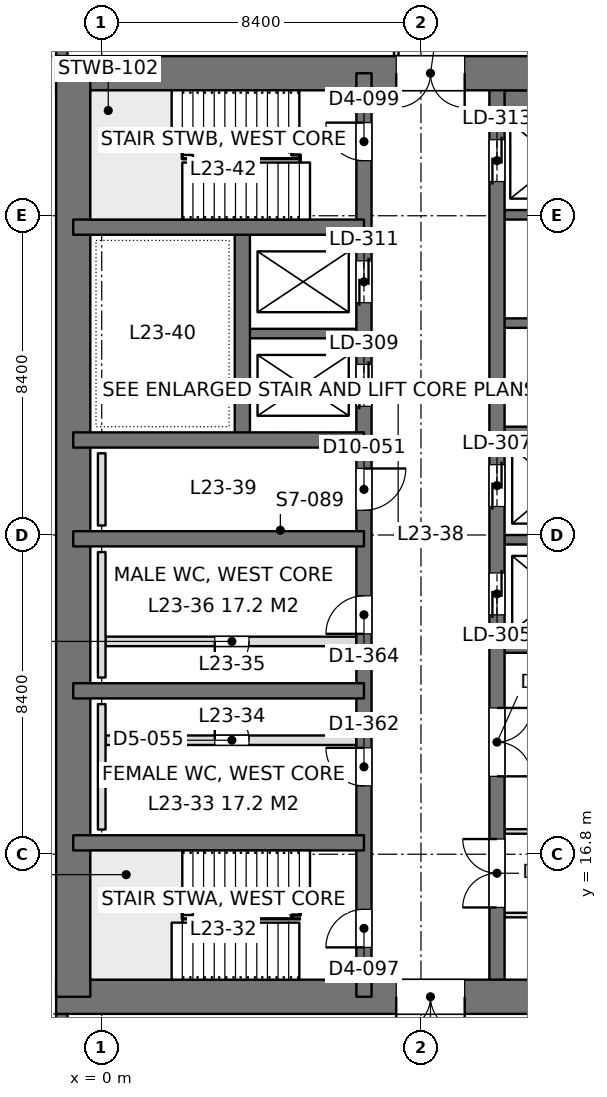
"""IFC4 building model, lengths in metres.
Left out: names, types, materials, properties, quantities, classifications, styles, units other than length and angle.
Written with IfcOpenShell. Run it as: python <this file> out.ifc"""

import sys

from ifc_helpers import new_model, si_unit, direction, frame, frame_2d, origin, place, context, subcontext, project, spatial, rectangle, extrude, element, fill, save


model = new_model("IFC4")
c1 = context("Model", 3, precision=1e-05, world=origin(), true_north=direction((0.0, 1.0)))
c2 = subcontext(c1, "Body", "Model", "MODEL_VIEW")
j1 = project(units=[si_unit("LENGTHUNIT", "METRE"), si_unit("PLANEANGLEUNIT", "RADIAN")], contexts=[c1])
p1 = place(None, origin())
s1 = spatial("IfcSite", under=j1, at=p1, CompositionType="ELEMENT")
p2 = place(p1, origin())
s2 = spatial("IfcBuilding", under=s1, at=p2, CompositionType="ELEMENT")
p3 = place(p2, frame((0.0, 0.0, 105.0)))
s3 = spatial("IfcBuildingStorey", under=s2, at=p3, CompositionType="ELEMENT", Elevation=105.0)
p4 = place(p3, frame((-1.2, 13.05, 0.0), z_axis=(0.0, 0.0, 1.0), x_axis=(1.0, 0.0, 0.0)))
e1 = element("IfcWall", 1, at=p4, inside=s3, PredefinedType="SHEAR", context=c2, shape_type="SweptSolid", body=[
    extrude(rectangle(XDim=18.0, YDim=0.9, at=frame_2d((9.0, 0.0))), origin(), (0.0, 0.0, 1.0), 4.2),
])
p5 = place(p4, frame((8.95, 0.0, 0.0)))
e2 = element("IfcOpeningElement", 2, at=p5, cuts=e1, PredefinedType="OPENING", context=c2, shape_type="SweptSolid", body=[
    extrude(rectangle(XDim=1.8, YDim=2.4, at=frame_2d((0.9, 1.2))), frame((0.0, 0.46, 0.0), z_axis=(0.0, -1.0, 0.0), x_axis=(1.0, 0.0, 0.0)), (0.0, 0.0, 1.0), 0.92),
])
p6 = place(p3, frame((-1.2, 37.35, 0.0), z_axis=(0.0, 0.0, 1.0), x_axis=(1.0, 0.0, 0.0)))
e3 = element("IfcWall", 3, at=p6, inside=s3, PredefinedType="SHEAR", context=c2, shape_type="SweptSolid", body=[
    extrude(rectangle(XDim=18.0, YDim=0.9, at=frame_2d((9.0, 0.0))), origin(), (0.0, 0.0, 1.0), 4.2),
])
p7 = place(p6, frame((8.95, 0.0, 0.0)))
e4 = element("IfcOpeningElement", 4, at=p7, cuts=e3, PredefinedType="OPENING", context=c2, shape_type="SweptSolid", body=[
    extrude(rectangle(XDim=1.8, YDim=2.4, at=frame_2d((0.9, 1.2))), frame((0.0, 0.46, 0.0), z_axis=(0.0, -1.0, 0.0), x_axis=(1.0, 0.0, 0.0)), (0.0, 0.0, 1.0), 0.92),
])
p8 = place(p3, frame((-0.75, 13.05, 0.0), z_axis=(0.0, 0.0, 1.0), x_axis=(0.0, 1.0, 0.0)))
e5 = element("IfcWall", 5, at=p8, inside=s3, PredefinedType="SHEAR", context=c2, shape_type="SweptSolid", body=[
    extrude(rectangle(XDim=24.3, YDim=0.9, at=frame_2d((12.15, 0.0))), origin(), (0.0, 0.0, 1.0), 4.2),
])
p9 = place(p3, frame((6.9, 13.05, 0.0), z_axis=(0.0, 0.0, 1.0), x_axis=(0.0, 1.0, 0.0)))
e6 = element("IfcWall", 6, at=p9, inside=s3, PredefinedType="SHEAR", context=c2, shape_type="SweptSolid", body=[
    extrude(rectangle(XDim=24.3, YDim=0.4, at=frame_2d((12.15, 0.0))), origin(), (0.0, 0.0, 1.0), 4.2),
])
p10 = place(p9, frame((1.3, 0.0, 0.0)))
e7 = element("IfcOpeningElement", 7, at=p10, cuts=e6, PredefinedType="OPENING", context=c2, shape_type="SweptSolid", body=[
    extrude(rectangle(XDim=1.0, YDim=2.2, at=frame_2d((0.5, 1.1))), frame((0.0, 0.21, 0.0), z_axis=(0.0, -1.0, 0.0), x_axis=(1.0, 0.0, 0.0)), (0.0, 0.0, 1.0), 0.42),
])
p11 = place(p9, frame((22.0, 0.0, 0.0)))
e8 = element("IfcOpeningElement", 8, at=p11, cuts=e6, PredefinedType="OPENING", context=c2, shape_type="SweptSolid", body=[
    extrude(rectangle(XDim=1.0, YDim=2.2, at=frame_2d((0.5, 1.1))), frame((0.0, 0.21, 0.0), z_axis=(0.0, -1.0, 0.0), x_axis=(1.0, 0.0, 0.0)), (0.0, 0.0, 1.0), 0.42),
])
p12 = place(p9, frame((5.55, 0.0, 0.0)))
e9 = element("IfcOpeningElement", 9, at=p12, cuts=e6, PredefinedType="OPENING", context=c2, shape_type="SweptSolid", body=[
    extrude(rectangle(XDim=1.0, YDim=2.2, at=frame_2d((0.5, 1.1))), frame((0.0, 0.21, 0.0), z_axis=(0.0, -1.0, 0.0), x_axis=(1.0, 0.0, 0.0)), (0.0, 0.0, 1.0), 0.42),
])
p13 = place(p9, frame((9.55, 0.0, 0.0)))
e10 = element("IfcOpeningElement", 10, at=p13, cuts=e6, PredefinedType="OPENING", context=c2, shape_type="SweptSolid", body=[
    extrude(rectangle(XDim=1.0, YDim=2.2, at=frame_2d((0.5, 1.1))), frame((0.0, 0.21, 0.0), z_axis=(0.0, -1.0, 0.0), x_axis=(1.0, 0.0, 0.0)), (0.0, 0.0, 1.0), 0.42),
])
p14 = place(p9, frame((12.8, 0.0, 0.0)))
e11 = element("IfcOpeningElement", 11, at=p14, cuts=e6, PredefinedType="OPENING", context=c2, shape_type="SweptSolid", body=[
    extrude(rectangle(XDim=1.1, YDim=2.2, at=frame_2d((0.55, 1.1))), frame((0.0, 0.21, 0.0), z_axis=(0.0, -1.0, 0.0), x_axis=(1.0, 0.0, 0.0)), (0.0, 0.0, 1.0), 0.42),
])
p15 = place(p9, frame((15.538, 0.0, 0.0)))
e12 = element("IfcOpeningElement", 12, at=p15, cuts=e6, PredefinedType="OPENING", context=c2, shape_type="SweptSolid", body=[
    extrude(rectangle(XDim=1.1, YDim=2.2, at=frame_2d((0.55, 1.1))), frame((0.0, 0.21, 0.0), z_axis=(0.0, -1.0, 0.0), x_axis=(1.0, 0.0, 0.0)), (0.0, 0.0, 1.0), 0.42),
])
p16 = place(p9, frame((18.262, 0.0, 0.0)))
e13 = element("IfcOpeningElement", 13, at=p16, cuts=e6, PredefinedType="OPENING", context=c2, shape_type="SweptSolid", body=[
    extrude(rectangle(XDim=1.1, YDim=2.2, at=frame_2d((0.55, 1.1))), frame((0.0, 0.21, 0.0), z_axis=(0.0, -1.0, 0.0), x_axis=(1.0, 0.0, 0.0)), (0.0, 0.0, 1.0), 0.42),
])
p17 = place(p3, frame((10.4, 13.05, 0.0), z_axis=(0.0, 0.0, 1.0), x_axis=(0.0, 1.0, 0.0)))
e14 = element("IfcWall", 14, at=p17, inside=s3, PredefinedType="SHEAR", context=c2, shape_type="SweptSolid", body=[
    extrude(rectangle(XDim=24.3, YDim=0.4, at=frame_2d((12.15, 0.0))), origin(), (0.0, 0.0, 1.0), 4.2),
])
p18 = place(p17, frame((10.05, 0.0, 0.0)))
e15 = element("IfcOpeningElement", 15, at=p18, cuts=e14, PredefinedType="OPENING", context=c2, shape_type="SweptSolid", body=[
    extrude(rectangle(XDim=1.1, YDim=2.2, at=frame_2d((0.55, 1.1))), frame((0.0, 0.21, 0.0), z_axis=(0.0, -1.0, 0.0), x_axis=(1.0, 0.0, 0.0)), (0.0, 0.0, 1.0), 0.42),
])
p19 = place(p17, frame((12.9, 0.0, 0.0)))
e16 = element("IfcOpeningElement", 16, at=p19, cuts=e14, PredefinedType="OPENING", context=c2, shape_type="SweptSolid", body=[
    extrude(rectangle(XDim=1.1, YDim=2.2, at=frame_2d((0.55, 1.1))), frame((0.0, 0.21, 0.0), z_axis=(0.0, -1.0, 0.0), x_axis=(1.0, 0.0, 0.0)), (0.0, 0.0, 1.0), 0.42),
])
p20 = place(p17, frame((21.45, 0.0, 0.0)))
e17 = element("IfcOpeningElement", 17, at=p20, cuts=e14, PredefinedType="OPENING", context=c2, shape_type="SweptSolid", body=[
    extrude(rectangle(XDim=1.1, YDim=2.2, at=frame_2d((0.55, 1.1))), frame((0.0, 0.21, 0.0), z_axis=(0.0, -1.0, 0.0), x_axis=(1.0, 0.0, 0.0)), (0.0, 0.0, 1.0), 0.42),
])
p21 = place(p17, frame((2.35, 0.0, 0.0)))
e18 = element("IfcOpeningElement", 18, at=p21, cuts=e14, PredefinedType="OPENING", context=c2, shape_type="SweptSolid", body=[
    extrude(rectangle(XDim=1.8, YDim=2.4, at=frame_2d((0.9, 1.2))), frame((0.0, 0.21, 0.0), z_axis=(0.0, -1.0, 0.0), x_axis=(1.0, 0.0, 0.0)), (0.0, 0.0, 1.0), 0.42),
])
p22 = place(p17, frame((5.8, 0.0, 0.0)))
e19 = element("IfcOpeningElement", 19, at=p22, cuts=e14, PredefinedType="OPENING", context=c2, shape_type="SweptSolid", body=[
    extrude(rectangle(XDim=1.8, YDim=2.4, at=frame_2d((0.9, 1.2))), frame((0.0, 0.21, 0.0), z_axis=(0.0, -1.0, 0.0), x_axis=(1.0, 0.0, 0.0)), (0.0, 0.0, 1.0), 0.42),
])
for number, where, z_axis, x_axis in (
    (20, (-0.75, 17.1, 0.0), (0.0, 0.0, 1.0), (1.0, 0.0, 0.0)),
    (21, (-0.75, 21.1, 0.0), (0.0, 0.0, 1.0), (1.0, 0.0, 0.0)),
    (22, (-0.75, 25.1, 0.0), (0.0, 0.0, 1.0), (1.0, 0.0, 0.0)),
    (23, (-0.75, 27.7, 0.0), (0.0, 0.0, 1.0), (1.0, 0.0, 0.0)),
    (24, (-0.75, 33.3, 0.0), (0.0, 0.0, 1.0), (1.0, 0.0, 0.0)),
):
    element("IfcWall", number, at=place(p3, frame(where, z_axis=z_axis, x_axis=x_axis)), inside=s3, PredefinedType="SHEAR", context=c2, shape_type="SweptSolid", body=[
        extrude(rectangle(XDim=7.65, YDim=0.4, at=frame_2d((3.825, 0.0))), origin(), (0.0, 0.0, 1.0), 4.2),
    ])
p23 = place(p3, frame((3.7, 27.7, 0.0), z_axis=(0.0, 0.0, 1.0), x_axis=(0.0, 1.0, 0.0)))
e25 = element("IfcWall", 25, at=p23, inside=s3, PredefinedType="SHEAR", context=c2, shape_type="SweptSolid", body=[
    extrude(rectangle(XDim=5.6, YDim=0.4, at=frame_2d((2.8, 0.0))), origin(), (0.0, 0.0, 1.0), 4.2),
])
p24 = place(p3, frame((3.7, 30.5, 0.0), z_axis=(0.0, 0.0, 1.0), x_axis=(1.0, 0.0, 0.0)))
e26 = element("IfcWall", 26, at=p24, inside=s3, PredefinedType="SHEAR", context=c2, shape_type="SweptSolid", body=[
    extrude(rectangle(XDim=3.2, YDim=0.25, at=frame_2d((1.6, 0.0))), origin(), (0.0, 0.0, 1.0), 4.2),
])
p25 = place(p3, frame((10.4, 22.225, 0.0), z_axis=(0.0, 0.0, 1.0), x_axis=(1.0, 0.0, 0.0)))
e27 = element("IfcWall", 27, at=p25, inside=s3, PredefinedType="SHEAR", context=c2, shape_type="SweptSolid", body=[
    extrude(rectangle(XDim=5.95, YDim=0.25, at=frame_2d((2.975, 0.0))), origin(), (0.0, 0.0, 1.0), 4.2),
])
for number, where, z_axis, x_axis in (
    (28, (10.4, 25.075, 0.0), (0.0, 0.0, 1.0), (1.0, 0.0, 0.0)),
    (29, (10.4, 27.925, 0.0), (0.0, 0.0, 1.0), (1.0, 0.0, 0.0)),
    (30, (10.4, 30.775, 0.0), (0.0, 0.0, 1.0), (1.0, 0.0, 0.0)),
    (31, (10.4, 33.625, 0.0), (0.0, 0.0, 1.0), (1.0, 0.0, 0.0)),
):
    element("IfcWall", number, at=place(p3, frame(where, z_axis=z_axis, x_axis=x_axis)), inside=s3, PredefinedType="SHEAR", context=c2, shape_type="SweptSolid", body=[
        extrude(rectangle(XDim=3.2, YDim=0.25, at=frame_2d((1.6, 0.0))), origin(), (0.0, 0.0, 1.0), 4.2),
    ])
p26 = place(p3, frame((10.4, 36.625, 0.0), z_axis=(0.0, 0.0, 1.0), x_axis=(1.0, 0.0, 0.0)))
e32 = element("IfcWall", 32, at=p26, inside=s3, PredefinedType="SHEAR", context=c2, shape_type="SweptSolid", body=[
    extrude(rectangle(XDim=3.2, YDim=0.55, at=frame_2d((1.6, 0.0))), origin(), (0.0, 0.0, 1.0), 4.2),
])
p27 = place(p3, frame((-1.05, 8.4, 0.0), z_axis=(0.0, 0.0, 1.0), x_axis=(0.0, 1.0, 0.0)))
e33 = element("IfcWall", 33, at=p27, inside=s3, PredefinedType="SOLIDWALL", context=c2, shape_type="SweptSolid", body=[
    extrude(rectangle(XDim=4.2, YDim=0.3, at=frame_2d((2.1, 0.0))), origin(), (0.0, 0.0, 1.0), 4.05),
])
p28 = place(p27, frame((0.9, 0.0, 0.9)))
e34 = element("IfcOpeningElement", 34, at=p28, cuts=e33, PredefinedType="OPENING", context=c2, shape_type="SweptSolid", body=[
    extrude(rectangle(XDim=2.4, YDim=1.9, at=frame_2d((1.2, 0.95))), frame((0.0, 0.16, 0.0), z_axis=(0.0, -1.0, 0.0), x_axis=(1.0, 0.0, 0.0)), (0.0, 0.0, 1.0), 0.32),
])
p29 = place(p3, frame((-1.05, 37.8, 0.0), z_axis=(0.0, 0.0, 1.0), x_axis=(0.0, 1.0, 0.0)))
e35 = element("IfcWall", 35, at=p29, inside=s3, PredefinedType="SOLIDWALL", context=c2, shape_type="SweptSolid", body=[
    extrude(rectangle(XDim=4.2, YDim=0.3, at=frame_2d((2.1, 0.0))), origin(), (0.0, 0.0, 1.0), 4.05),
])
p30 = place(p29, frame((0.9, 0.0, 0.9)))
e36 = element("IfcOpeningElement", 36, at=p30, cuts=e35, PredefinedType="OPENING", context=c2, shape_type="SweptSolid", body=[
    extrude(rectangle(XDim=2.4, YDim=1.9, at=frame_2d((1.2, 0.95))), frame((0.0, 0.16, 0.0), z_axis=(0.0, -1.0, 0.0), x_axis=(1.0, 0.0, 0.0)), (0.0, 0.0, 1.0), 0.32),
])
p31 = place(p3, frame((10.598, 17.4, 0.0), z_axis=(0.0, 0.0, 1.0), x_axis=(1.0, 0.0, 0.0)))
e37 = element("IfcWall", 37, at=p31, inside=s3, PredefinedType="PARTITIONING", context=c2, shape_type="SweptSolid", body=[
    extrude(rectangle(XDim=5.904, YDim=0.12, at=frame_2d((2.952, 0.0))), origin(), (0.0, 0.0, 1.0), 3.55),
])
p32 = place(p31, frame((4.152, 0.0, 0.0)))
e38 = element("IfcOpeningElement", 38, at=p32, cuts=e37, PredefinedType="OPENING", context=c2, shape_type="SweptSolid", body=[
    extrude(rectangle(XDim=1.0, YDim=2.4, at=frame_2d((0.5, 1.2))), frame((0.0, 0.07, 0.0), z_axis=(0.0, -1.0, 0.0), x_axis=(1.0, 0.0, 0.0)), (0.0, 0.0, 1.0), 0.14),
])
p33 = place(p3, frame((10.598, 15.2, 0.0), z_axis=(0.0, 0.0, 1.0), x_axis=(1.0, 0.0, 0.0)))
e39 = element("IfcWall", 39, at=p33, inside=s3, PredefinedType="PARTITIONING", context=c2, shape_type="SweptSolid", body=[
    extrude(rectangle(XDim=6.204, YDim=0.12, at=frame_2d((3.102, 0.0))), origin(), (0.0, 0.0, 1.0), 3.55),
])
p34 = place(p3, frame((7.75, 37.8, 0.0), z_axis=(0.0, 0.0, 1.0), x_axis=(0.0, 1.0, 0.0)))
e40 = element("IfcWall", 40, at=p34, inside=s3, PredefinedType="PARTITIONING", context=c2, shape_type="SweptSolid", body=[
    extrude(rectangle(XDim=2.0, YDim=0.12, at=frame_2d((1.0, 0.0))), origin(), (0.0, 0.0, 1.0), 4.05),
])
p35 = place(p3, frame((0.1, 22.4, 0.0), z_axis=(0.0, 0.0, 1.0), x_axis=(1.0, 0.0, 0.0)))
e41 = element("IfcWall", 41, at=p35, inside=s3, PredefinedType="PARTITIONING", context=c2, shape_type="SweptSolid", body=[
    extrude(rectangle(XDim=6.6, YDim=0.25, at=frame_2d((3.3, 0.0))), origin(), (0.0, 0.0, 1.0), 4.0),
])
p36 = place(p35, frame((2.875, 0.0, 0.0)))
e42 = element("IfcOpeningElement", 42, at=p36, cuts=e41, PredefinedType="OPENING", context=c2, shape_type="SweptSolid", body=[
    extrude(rectangle(XDim=0.9, YDim=2.2, at=frame_2d((0.45, 1.1))), frame((0.0, 0.135, 0.0), z_axis=(0.0, -1.0, 0.0), x_axis=(1.0, 0.0, 0.0)), (0.0, 0.0, 1.0), 0.27),
])
p37 = place(p3, frame((0.1, 19.8, 0.0), z_axis=(0.0, 0.0, 1.0), x_axis=(1.0, 0.0, 0.0)))
e43 = element("IfcWall", 43, at=p37, inside=s3, PredefinedType="PARTITIONING", context=c2, shape_type="SweptSolid", body=[
    extrude(rectangle(XDim=6.6, YDim=0.25, at=frame_2d((3.3, 0.0))), origin(), (0.0, 0.0, 1.0), 4.0),
])
p38 = place(p37, frame((2.875, 0.0, 0.0)))
e44 = element("IfcOpeningElement", 44, at=p38, cuts=e43, PredefinedType="OPENING", context=c2, shape_type="SweptSolid", body=[
    extrude(rectangle(XDim=0.9, YDim=2.2, at=frame_2d((0.45, 1.1))), frame((0.0, 0.135, 0.0), z_axis=(0.0, -1.0, 0.0), x_axis=(1.0, 0.0, 0.0)), (0.0, 0.0, 1.0), 0.27),
])
for number, where, z_axis, x_axis in (
    (45, (0.0, 17.45, 0.0), (0.0, 0.0, 1.0), (0.0, 1.0, 0.0)),
    (46, (0.0, 21.45, 0.0), (0.0, 0.0, 1.0), (0.0, 1.0, 0.0)),
):
    element("IfcWall", number, at=place(p3, frame(where, z_axis=z_axis, x_axis=x_axis)), inside=s3, PredefinedType="PLUMBINGWALL", context=c2, shape_type="SweptSolid", body=[
        extrude(rectangle(XDim=3.3, YDim=0.2, at=frame_2d((1.65, 0.0))), origin(), (0.0, 0.0, 1.0), 1.2),
    ])
p39 = place(p3, frame((0.0, 25.45, 0.0), z_axis=(0.0, 0.0, 1.0), x_axis=(0.0, 1.0, 0.0)))
e47 = element("IfcWall", 47, at=p39, inside=s3, PredefinedType="PLUMBINGWALL", context=c2, shape_type="SweptSolid", body=[
    extrude(rectangle(XDim=1.9, YDim=0.2, at=frame_2d((0.95, 0.0))), origin(), (0.0, 0.0, 1.0), 1.2),
])
p40 = place(p5, frame((1.8, 0.0, 0.0), z_axis=(0.0, 0.0, 1.0), x_axis=(-1.0, 0.0, 0.0)))
e48 = element("IfcDoor", 48, at=p40, inside=s3, OperationType="DOUBLE_DOOR_SINGLE_SWING", PredefinedType="DOOR", context=c2, shape_type="SweptSolid", body=[
    extrude(rectangle(XDim=1.8, YDim=2.4, at=frame_2d((0.9, 1.2))), frame((0.0, 0.025, 0.0), z_axis=(0.0, -1.0, 0.0), x_axis=(1.0, 0.0, 0.0)), (0.0, 0.0, 1.0), 0.05),
])
fill(e2, e48)
p41 = place(p7, frame((1.8, 0.0, 0.0), z_axis=(0.0, 0.0, 1.0), x_axis=(-1.0, 0.0, 0.0)))
e49 = element("IfcDoor", 49, at=p41, inside=s3, OperationType="DOUBLE_DOOR_SINGLE_SWING", PredefinedType="DOOR", context=c2, shape_type="SweptSolid", body=[
    extrude(rectangle(XDim=1.8, YDim=2.4, at=frame_2d((0.9, 1.2))), frame((0.0, 0.025, 0.0), z_axis=(0.0, -1.0, 0.0), x_axis=(1.0, 0.0, 0.0)), (0.0, 0.0, 1.0), 0.05),
])
fill(e4, e49)
p42 = place(p10, origin())
e50 = element("IfcDoor", 50, at=p42, inside=s3, OperationType="SINGLE_SWING_LEFT", PredefinedType="DOOR", context=c2, shape_type="SweptSolid", body=[
    extrude(rectangle(XDim=1.0, YDim=2.2, at=frame_2d((0.5, 1.1))), frame((0.0, 0.025, 0.0), z_axis=(0.0, -1.0, 0.0), x_axis=(1.0, 0.0, 0.0)), (0.0, 0.0, 1.0), 0.05),
])
fill(e7, e50)
p43 = place(p11, origin())
e51 = element("IfcDoor", 51, at=p43, inside=s3, OperationType="SINGLE_SWING_RIGHT", PredefinedType="DOOR", context=c2, shape_type="SweptSolid", body=[
    extrude(rectangle(XDim=1.0, YDim=2.2, at=frame_2d((0.5, 1.1))), frame((0.0, 0.025, 0.0), z_axis=(0.0, -1.0, 0.0), x_axis=(1.0, 0.0, 0.0)), (0.0, 0.0, 1.0), 0.05),
])
fill(e8, e51)
p44 = place(p12, origin())
e52 = element("IfcDoor", 52, at=p44, inside=s3, OperationType="SINGLE_SWING_RIGHT", PredefinedType="DOOR", context=c2, shape_type="SweptSolid", body=[
    extrude(rectangle(XDim=1.0, YDim=2.2, at=frame_2d((0.5, 1.1))), frame((0.0, 0.025, 0.0), z_axis=(0.0, -1.0, 0.0), x_axis=(1.0, 0.0, 0.0)), (0.0, 0.0, 1.0), 0.05),
])
fill(e9, e52)
p45 = place(p13, origin())
e53 = element("IfcDoor", 53, at=p45, inside=s3, OperationType="SINGLE_SWING_LEFT", PredefinedType="DOOR", context=c2, shape_type="SweptSolid", body=[
    extrude(rectangle(XDim=1.0, YDim=2.2, at=frame_2d((0.5, 1.1))), frame((0.0, 0.025, 0.0), z_axis=(0.0, -1.0, 0.0), x_axis=(1.0, 0.0, 0.0)), (0.0, 0.0, 1.0), 0.05),
])
fill(e10, e53)
p46 = place(p14, frame((1.1, 0.0, 0.0), z_axis=(0.0, 0.0, 1.0), x_axis=(-1.0, 0.0, 0.0)))
e54 = element("IfcDoor", 54, at=p46, inside=s3, OperationType="SINGLE_SWING_LEFT", PredefinedType="DOOR", context=c2, shape_type="SweptSolid", body=[
    extrude(rectangle(XDim=1.1, YDim=2.2, at=frame_2d((0.55, 1.1))), frame((0.0, 0.025, 0.0), z_axis=(0.0, -1.0, 0.0), x_axis=(1.0, 0.0, 0.0)), (0.0, 0.0, 1.0), 0.05),
])
fill(e11, e54)
p47 = place(p18, origin())
e55 = element("IfcDoor", 55, at=p47, inside=s3, OperationType="DOUBLE_DOOR_SLIDING", PredefinedType="DOOR", context=c2, shape_type="SweptSolid", body=[
    extrude(rectangle(XDim=1.1, YDim=2.2, at=frame_2d((0.55, 1.1))), frame((0.0, 0.025, 0.0), z_axis=(0.0, -1.0, 0.0), x_axis=(1.0, 0.0, 0.0)), (0.0, 0.0, 1.0), 0.05),
])
fill(e15, e55)
p48 = place(p19, origin())
e56 = element("IfcDoor", 56, at=p48, inside=s3, OperationType="DOUBLE_DOOR_SLIDING", PredefinedType="DOOR", context=c2, shape_type="SweptSolid", body=[
    extrude(rectangle(XDim=1.1, YDim=2.2, at=frame_2d((0.55, 1.1))), frame((0.0, 0.025, 0.0), z_axis=(0.0, -1.0, 0.0), x_axis=(1.0, 0.0, 0.0)), (0.0, 0.0, 1.0), 0.05),
])
fill(e16, e56)
p49 = place(p20, origin())
e57 = element("IfcDoor", 57, at=p49, inside=s3, OperationType="DOUBLE_DOOR_SLIDING", PredefinedType="DOOR", context=c2, shape_type="SweptSolid", body=[
    extrude(rectangle(XDim=1.1, YDim=2.2, at=frame_2d((0.55, 1.1))), frame((0.0, 0.025, 0.0), z_axis=(0.0, -1.0, 0.0), x_axis=(1.0, 0.0, 0.0)), (0.0, 0.0, 1.0), 0.05),
])
fill(e17, e57)
p50 = place(p15, origin())
e58 = element("IfcDoor", 58, at=p50, inside=s3, OperationType="DOUBLE_DOOR_SLIDING", PredefinedType="DOOR", context=c2, shape_type="SweptSolid", body=[
    extrude(rectangle(XDim=1.1, YDim=2.2, at=frame_2d((0.55, 1.1))), frame((0.0, 0.025, 0.0), z_axis=(0.0, -1.0, 0.0), x_axis=(1.0, 0.0, 0.0)), (0.0, 0.0, 1.0), 0.05),
])
fill(e12, e58)
p51 = place(p16, origin())
e59 = element("IfcDoor", 59, at=p51, inside=s3, OperationType="DOUBLE_DOOR_SLIDING", PredefinedType="DOOR", context=c2, shape_type="SweptSolid", body=[
    extrude(rectangle(XDim=1.1, YDim=2.2, at=frame_2d((0.55, 1.1))), frame((0.0, 0.025, 0.0), z_axis=(0.0, -1.0, 0.0), x_axis=(1.0, 0.0, 0.0)), (0.0, 0.0, 1.0), 0.05),
])
fill(e13, e59)
p52 = place(p21, origin())
e60 = element("IfcDoor", 60, at=p52, inside=s3, OperationType="DOUBLE_DOOR_SINGLE_SWING", PredefinedType="DOOR", context=c2, shape_type="SweptSolid", body=[
    extrude(rectangle(XDim=1.8, YDim=2.4, at=frame_2d((0.9, 1.2))), frame((0.0, 0.025, 0.0), z_axis=(0.0, -1.0, 0.0), x_axis=(1.0, 0.0, 0.0)), (0.0, 0.0, 1.0), 0.05),
])
fill(e18, e60)
p53 = place(p22, frame((1.8, 0.0, 0.0), z_axis=(0.0, 0.0, 1.0), x_axis=(-1.0, 0.0, 0.0)))
e61 = element("IfcDoor", 61, at=p53, inside=s3, OperationType="DOUBLE_DOOR_SINGLE_SWING", PredefinedType="DOOR", context=c2, shape_type="SweptSolid", body=[
    extrude(rectangle(XDim=1.8, YDim=2.4, at=frame_2d((0.9, 1.2))), frame((0.0, 0.025, 0.0), z_axis=(0.0, -1.0, 0.0), x_axis=(1.0, 0.0, 0.0)), (0.0, 0.0, 1.0), 0.05),
])
fill(e19, e61)
p54 = place(p36, frame((0.9, 0.0, 0.0), z_axis=(0.0, 0.0, 1.0), x_axis=(-1.0, 0.0, 0.0)))
e62 = element("IfcDoor", 62, at=p54, inside=s3, OperationType="SINGLE_SWING_RIGHT", PredefinedType="DOOR", context=c2, shape_type="SweptSolid", body=[
    extrude(rectangle(XDim=0.9, YDim=2.2, at=frame_2d((0.45, 1.1))), frame((0.0, 0.025, 0.0), z_axis=(0.0, -1.0, 0.0), x_axis=(1.0, 0.0, 0.0)), (0.0, 0.0, 1.0), 0.05),
])
fill(e42, e62)
p55 = place(p38, origin())
e63 = element("IfcDoor", 63, at=p55, inside=s3, OperationType="SINGLE_SWING_LEFT", PredefinedType="DOOR", context=c2, shape_type="SweptSolid", body=[
    extrude(rectangle(XDim=0.9, YDim=2.2, at=frame_2d((0.45, 1.1))), frame((0.0, 0.025, 0.0), z_axis=(0.0, -1.0, 0.0), x_axis=(1.0, 0.0, 0.0)), (0.0, 0.0, 1.0), 0.05),
])
fill(e44, e63)
save(model, sys.argv[1])
